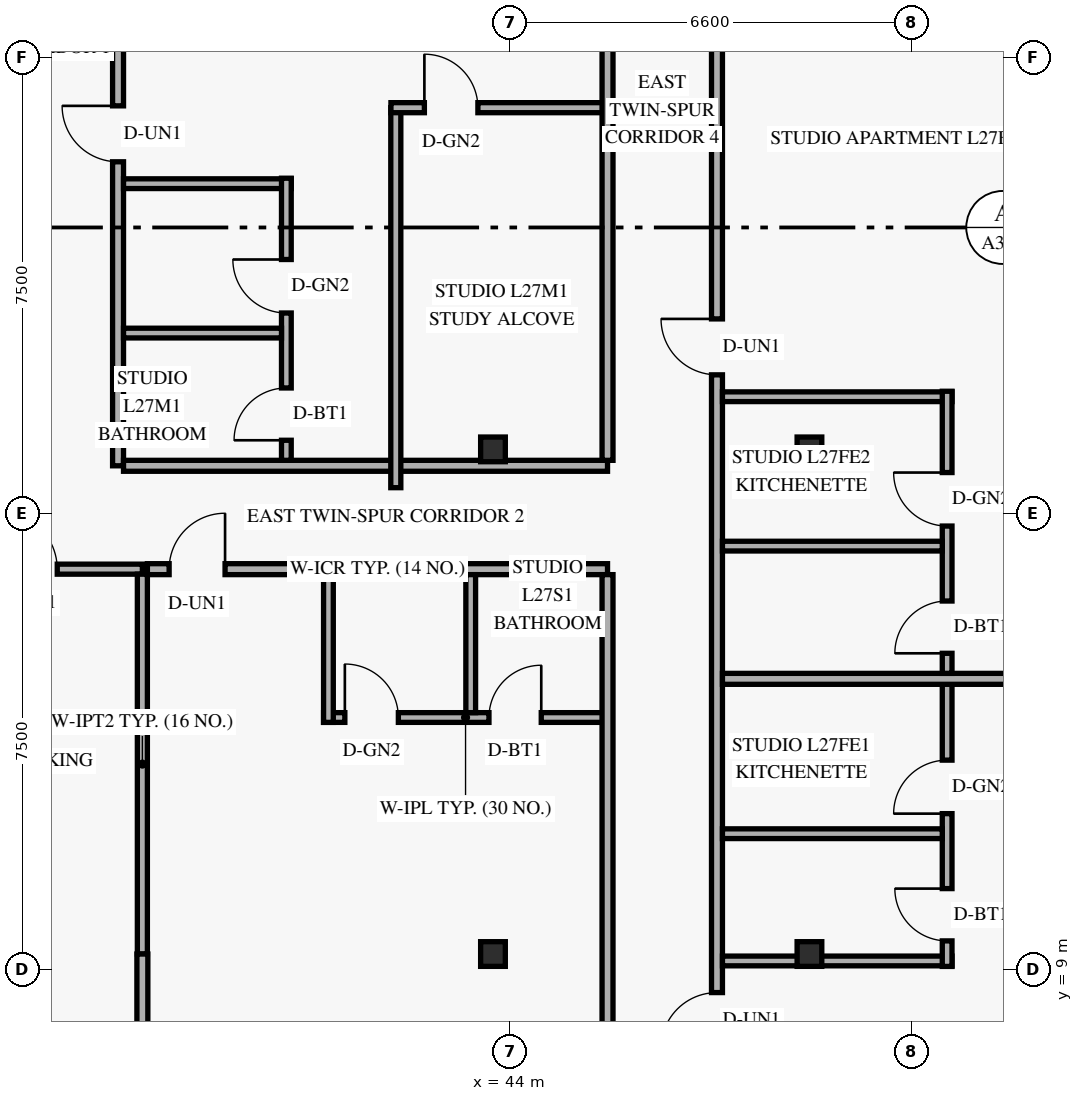
"""IFC4 building model, lengths in metres.
Left out: names, types, materials, properties, quantities, classifications, styles, units other than length and angle.
Written with IfcOpenShell. Run it as: python <this file> out.ifc"""

import sys

from ifc_helpers import new_model, si_unit, direction, frame, frame_2d, origin, origin_2d, place, context, subcontext, project, spatial, rectangle, hollow_rectangle, extrude, element, fill, save


model = new_model("IFC4")
c1 = context("Model", 3, precision=1e-05, world=origin(), true_north=direction((0.0, 1.0)))
c2 = subcontext(c1, "Body", "Model", "MODEL_VIEW")
j1 = project(units=[si_unit("LENGTHUNIT", "METRE"), si_unit("PLANEANGLEUNIT", "RADIAN")], contexts=[c1])
p1 = place(None, origin())
s1 = spatial("IfcSite", under=j1, at=p1, CompositionType="ELEMENT")
p2 = place(p1, origin())
s2 = spatial("IfcBuilding", under=s1, at=p2, CompositionType="ELEMENT")
p3 = place(p2, frame((0.0, 0.0, 106.2)))
s3 = spatial("IfcBuildingStorey", under=s2, at=p3, CompositionType="ELEMENT", Elevation=106.2)
for number, where, z_axis, x_axis in (
    (1, (43.653, 9.25, 0.0), (0.035, 0.0, 0.999), (0.0, 1.0, 0.0)),
    (2, (43.653, 17.55, 0.0), (0.035, 0.0, 0.999), (0.0, 1.0, 0.0)),
):
    element("IfcColumn", number, at=place(p3, frame(where, z_axis=z_axis, x_axis=x_axis)), inside=s3, PredefinedType="COLUMN", context=c2, shape_type="SweptSolid", body=[
        extrude(hollow_rectangle(XDim=0.406, YDim=0.406, WallThickness=0.016, at=origin_2d()), origin(), (0.0, 0.0, 1.0), 3.602),
    ])
for number, where, z_axis, x_axis in (
    (3, (48.816, 9.25, 0.0), (0.058, 0.0, 0.998), (0.0, 1.0, 0.0)),
    (4, (48.816, 17.55, 0.0), (0.058, 0.0, 0.998), (0.0, 1.0, 0.0)),
):
    element("IfcColumn", number, at=place(p3, frame(where, z_axis=z_axis, x_axis=x_axis)), inside=s3, PredefinedType="COLUMN", context=c2, shape_type="SweptSolid", body=[
        extrude(hollow_rectangle(XDim=0.406, YDim=0.406, WallThickness=0.016, at=origin_2d()), origin(), (0.0, 0.0, 1.0), 3.606),
    ])
p4 = place(p3, frame((32.732, 15.58, 0.0), z_axis=(0.0, 0.0, 1.0), x_axis=(1.0, 0.0, 0.0)))
e5 = element("IfcWall", 5, at=p4, inside=s3, PredefinedType="PARTITIONING", context=c2, shape_type="SweptSolid", body=[
    extrude(rectangle(XDim=5.218, YDim=0.165, at=frame_2d((2.609, 0.0))), origin(), (0.0, 0.0, 1.0), 2.731),
])
p5 = place(p4, frame((2.867, 0.0, 0.0)))
e6 = element("IfcOpeningElement", 6, at=p5, cuts=e5, PredefinedType="OPENING", context=c2, shape_type="SweptSolid", body=[
    extrude(rectangle(XDim=0.95, YDim=2.15, at=frame_2d((0.475, 1.075))), frame((0.0, 0.093, 0.0), z_axis=(0.0, -1.0, 0.0), x_axis=(1.0, 0.0, 0.0)), (0.0, 0.0, 1.0), 0.185),
])
p6 = place(p3, frame((37.95, 9.25, 0.0), z_axis=(0.0, 0.0, 1.0), x_axis=(0.0, 1.0, 0.0)))
e7 = element("IfcWall", 7, at=p6, inside=s3, PredefinedType="PARTITIONING", context=c2, shape_type="SweptSolid", body=[
    extrude(rectangle(XDim=6.248, YDim=0.165, at=frame_2d((3.124, 0.0))), origin(), (0.0, 0.0, 1.0), 2.731),
])
p7 = place(p3, frame((37.55, 17.28, 0.0), z_axis=(0.0, 0.0, 1.0), x_axis=(0.0, 1.0, 0.0)))
e8 = element("IfcWall", 8, at=p7, inside=s3, PredefinedType="STANDARD", context=c2, shape_type="SweptSolid", body=[
    extrude(rectangle(XDim=10.28, YDim=0.18, at=frame_2d((5.14, 0.0))), origin(), (0.0, 0.0, 1.0), 2.731),
])
p8 = place(p7, frame((5.0, 0.0, 0.0)))
e9 = element("IfcOpeningElement", 9, at=p8, cuts=e8, PredefinedType="OPENING", context=c2, shape_type="SweptSolid", body=[
    extrude(rectangle(XDim=0.92, YDim=2.15, at=frame_2d((0.46, 1.075))), frame((0.0, 0.1, 0.0), z_axis=(0.0, -1.0, 0.0), x_axis=(1.0, 0.0, 0.0)), (0.0, 0.0, 1.0), 0.2),
])
p9 = place(p3, frame((38.032, 15.58, 0.0), z_axis=(0.0, 0.0, 1.0), x_axis=(1.0, 0.0, 0.0)))
e10 = element("IfcWall", 10, at=p9, inside=s3, PredefinedType="STANDARD", context=c2, shape_type="SweptSolid", body=[
    extrude(rectangle(XDim=7.568, YDim=0.18, at=frame_2d((3.784, 0.0))), origin(), (0.0, 0.0, 1.0), 2.731),
])
p10 = place(p9, frame((0.357, 0.0, 0.0)))
e11 = element("IfcOpeningElement", 11, at=p10, cuts=e10, PredefinedType="OPENING", context=c2, shape_type="SweptSolid", body=[
    extrude(rectangle(XDim=0.92, YDim=2.15, at=frame_2d((0.46, 1.075))), frame((0.0, 0.1, 0.0), z_axis=(0.0, -1.0, 0.0), x_axis=(1.0, 0.0, 0.0)), (0.0, 0.0, 1.0), 0.2),
])
p11 = place(p3, frame((37.64, 17.28, 0.0), z_axis=(0.0, 0.0, 1.0), x_axis=(1.0, 0.0, 0.0)))
e12 = element("IfcWall", 12, at=p11, inside=s3, PredefinedType="STANDARD", context=c2, shape_type="SweptSolid", body=[
    extrude(rectangle(XDim=7.96, YDim=0.18, at=frame_2d((3.98, 0.0))), origin(), (0.0, 0.0, 1.0), 2.731),
])
p12 = place(p3, frame((37.95, 2.98, 0.0), z_axis=(0.0, 0.0, 1.0), x_axis=(0.0, 1.0, 0.0)))
e13 = element("IfcWall", 13, at=p12, inside=s3, PredefinedType="PARTITIONING", context=c2, shape_type="SweptSolid", body=[
    extrude(rectangle(XDim=6.27, YDim=0.18, at=frame_2d((3.135, 0.0))), origin(), (0.0, 0.0, 1.0), 2.731),
])
p13 = place(p3, frame((40.93, 13.14, 0.0), z_axis=(0.0, 0.0, 1.0), x_axis=(1.0, 0.0, 0.0)))
e14 = element("IfcWall", 14, at=p13, inside=s3, PredefinedType="PLUMBINGWALL", context=c2, shape_type="SweptSolid", body=[
    extrude(rectangle(XDim=4.67, YDim=0.16, at=frame_2d((2.335, 0.0))), origin(), (0.0, 0.0, 1.0), 2.731),
])
p14 = place(p13, frame((0.35, 0.0, 0.0)))
e15 = element("IfcOpeningElement", 15, at=p14, cuts=e14, PredefinedType="OPENING", context=c2, shape_type="SweptSolid", body=[
    extrude(rectangle(XDim=0.88, YDim=2.12, at=frame_2d((0.44, 1.06))), frame((0.0, 0.09, 0.0), z_axis=(0.0, -1.0, 0.0), x_axis=(1.0, 0.0, 0.0)), (0.0, 0.0, 1.0), 0.18),
])
p15 = place(p13, frame((2.72, 0.0, 0.0)))
e16 = element("IfcOpeningElement", 16, at=p15, cuts=e14, PredefinedType="OPENING", context=c2, shape_type="SweptSolid", body=[
    extrude(rectangle(XDim=0.86, YDim=2.12, at=frame_2d((0.43, 1.06))), frame((0.0, 0.09, 0.0), z_axis=(0.0, -1.0, 0.0), x_axis=(1.0, 0.0, 0.0)), (0.0, 0.0, 1.0), 0.18),
])
p16 = place(p3, frame((41.01, 13.06, 0.0), z_axis=(0.0, 0.0, 1.0), x_axis=(0.0, 1.0, 0.0)))
e17 = element("IfcWall", 17, at=p16, inside=s3, PredefinedType="PLUMBINGWALL", context=c2, shape_type="SweptSolid", body=[
    extrude(rectangle(XDim=2.43, YDim=0.16, at=frame_2d((1.215, 0.0))), origin(), (0.0, 0.0, 1.0), 2.988),
])
p17 = place(p3, frame((43.35, 13.22, 0.0), z_axis=(0.0, 0.0, 1.0), x_axis=(0.0, 1.0, 0.0)))
e18 = element("IfcWall", 18, at=p17, inside=s3, PredefinedType="PLUMBINGWALL", context=c2, shape_type="SweptSolid", body=[
    extrude(rectangle(XDim=2.27, YDim=0.16, at=frame_2d((1.135, 0.0))), origin(), (0.0, 0.0, 1.0), 2.988),
])
p18 = place(p3, frame((37.64, 21.92, 0.0), z_axis=(0.0, 0.0, 1.0), x_axis=(1.0, 0.0, 0.0)))
e19 = element("IfcWall", 19, at=p18, inside=s3, PredefinedType="PLUMBINGWALL", context=c2, shape_type="SweptSolid", body=[
    extrude(rectangle(XDim=2.758, YDim=0.16, at=frame_2d((1.379, 0.0))), origin(), (0.0, 0.0, 1.0), 3.36),
])
p19 = place(p3, frame((40.318, 17.37, 0.0), z_axis=(0.0, 0.0, 1.0), x_axis=(0.0, 1.0, 0.0)))
e20 = element("IfcWall", 20, at=p19, inside=s3, PredefinedType="PLUMBINGWALL", context=c2, shape_type="SweptSolid", body=[
    extrude(rectangle(XDim=4.64, YDim=0.16, at=frame_2d((2.32, 0.0))), origin(), (0.0, 0.0, 1.0), 2.731),
])
p20 = place(p19, frame((0.33, 0.0, 0.0)))
e21 = element("IfcOpeningElement", 21, at=p20, cuts=e20, PredefinedType="OPENING", context=c2, shape_type="SweptSolid", body=[
    extrude(rectangle(XDim=0.86, YDim=2.12, at=frame_2d((0.43, 1.06))), frame((0.0, 0.09, 0.0), z_axis=(0.0, -1.0, 0.0), x_axis=(1.0, 0.0, 0.0)), (0.0, 0.0, 1.0), 0.18),
])
p21 = place(p19, frame((2.423, 0.0, 0.0)))
e22 = element("IfcOpeningElement", 22, at=p21, cuts=e20, PredefinedType="OPENING", context=c2, shape_type="SweptSolid", body=[
    extrude(rectangle(XDim=0.88, YDim=2.12, at=frame_2d((0.44, 1.06))), frame((0.0, 0.09, 0.0), z_axis=(0.0, -1.0, 0.0), x_axis=(1.0, 0.0, 0.0)), (0.0, 0.0, 1.0), 0.18),
])
p22 = place(p3, frame((37.64, 19.463, 0.0), z_axis=(0.0, 0.0, 1.0), x_axis=(1.0, 0.0, 0.0)))
e23 = element("IfcWall", 23, at=p22, inside=s3, PredefinedType="PLUMBINGWALL", context=c2, shape_type="SweptSolid", body=[
    extrude(rectangle(XDim=2.598, YDim=0.16, at=frame_2d((1.299, 0.0))), origin(), (0.0, 0.0, 1.0), 3.36),
])
p23 = place(p3, frame((42.118, 16.92, 0.0), z_axis=(0.0, 0.0, 1.0), x_axis=(0.0, 1.0, 0.0)))
e24 = element("IfcWall", 24, at=p23, inside=s3, PredefinedType="PARTITIONING", context=c2, shape_type="SweptSolid", body=[
    extrude(rectangle(XDim=6.25, YDim=0.165, at=frame_2d((3.125, 0.0))), origin(), (0.0, 0.0, 1.0), 2.731),
])
p24 = place(p3, frame((42.038, 23.17, 0.0), z_axis=(0.0, 0.0, 1.0), x_axis=(1.0, 0.0, 0.0)))
e25 = element("IfcWall", 25, at=p24, inside=s3, PredefinedType="PARTITIONING", context=c2, shape_type="SweptSolid", body=[
    extrude(rectangle(XDim=3.922, YDim=0.165, at=frame_2d((1.961, 0.0))), origin(), (0.0, 0.0, 1.0), 2.731),
])
p25 = place(p24, frame((0.55, 0.0, 0.0)))
e26 = element("IfcOpeningElement", 26, at=p25, cuts=e25, PredefinedType="OPENING", context=c2, shape_type="SweptSolid", body=[
    extrude(rectangle(XDim=0.88, YDim=2.12, at=frame_2d((0.44, 1.06))), frame((0.0, 0.093, 0.0), z_axis=(0.0, -1.0, 0.0), x_axis=(1.0, 0.0, 0.0)), (0.0, 0.0, 1.0), 0.185),
])
p26 = place(p3, frame((47.4, 2.98, 0.0), z_axis=(0.0, 0.0, 1.0), x_axis=(0.0, 1.0, 0.0)))
e27 = element("IfcWall", 27, at=p26, inside=s3, PredefinedType="STANDARD", context=c2, shape_type="SweptSolid", body=[
    extrude(rectangle(XDim=42.04, YDim=0.18, at=frame_2d((21.02, 0.0))), origin(), (0.0, 0.0, 1.0), 2.731),
])
p27 = place(p26, frame((4.716, 0.0, 0.0)))
e28 = element("IfcOpeningElement", 28, at=p27, cuts=e27, PredefinedType="OPENING", context=c2, shape_type="SweptSolid", body=[
    extrude(rectangle(XDim=0.92, YDim=2.15, at=frame_2d((0.46, 1.075))), frame((0.0, 0.1, 0.0), z_axis=(0.0, -1.0, 0.0), x_axis=(1.0, 0.0, 0.0)), (0.0, 0.0, 1.0), 0.2),
])
p28 = place(p26, frame((15.796, 0.0, 0.0)))
e29 = element("IfcOpeningElement", 29, at=p28, cuts=e27, PredefinedType="OPENING", context=c2, shape_type="SweptSolid", body=[
    extrude(rectangle(XDim=0.92, YDim=2.15, at=frame_2d((0.46, 1.075))), frame((0.0, 0.1, 0.0), z_axis=(0.0, -1.0, 0.0), x_axis=(1.0, 0.0, 0.0)), (0.0, 0.0, 1.0), 0.2),
])
p29 = place(p26, frame((23.565, 0.0, 0.0)))
e30 = element("IfcOpeningElement", 30, at=p29, cuts=e27, PredefinedType="OPENING", context=c2, shape_type="SweptSolid", body=[
    extrude(rectangle(XDim=0.92, YDim=2.15, at=frame_2d((0.46, 1.075))), frame((0.0, 0.1, 0.0), z_axis=(0.0, -1.0, 0.0), x_axis=(1.0, 0.0, 0.0)), (0.0, 0.0, 1.0), 0.2),
])
p30 = place(p26, frame((39.348, 0.0, 0.0)))
e31 = element("IfcOpeningElement", 31, at=p30, cuts=e27, PredefinedType="OPENING", context=c2, shape_type="SweptSolid", body=[
    extrude(rectangle(XDim=0.92, YDim=2.15, at=frame_2d((0.46, 1.075))), frame((0.0, 0.1, 0.0), z_axis=(0.0, -1.0, 0.0), x_axis=(1.0, 0.0, 0.0)), (0.0, 0.0, 1.0), 0.2),
])
p31 = place(p3, frame((45.6, 2.98, 0.0), z_axis=(0.0, 0.0, 1.0), x_axis=(0.0, 1.0, 0.0)))
e32 = element("IfcWall", 32, at=p31, inside=s3, PredefinedType="STANDARD", context=c2, shape_type="SweptSolid", body=[
    extrude(rectangle(XDim=12.51, YDim=0.18, at=frame_2d((6.255, 0.0))), origin(), (0.0, 0.0, 1.0), 2.731),
])
p32 = place(p3, frame((45.6, 17.37, 0.0), z_axis=(0.0, 0.0, 1.0), x_axis=(0.0, 1.0, 0.0)))
e33 = element("IfcWall", 33, at=p32, inside=s3, PredefinedType="STANDARD", context=c2, shape_type="SweptSolid", body=[
    extrude(rectangle(XDim=10.1, YDim=0.18, at=frame_2d((5.05, 0.0))), origin(), (0.0, 0.0, 1.0), 2.731),
])
p33 = place(p3, frame((47.49, 9.136, 0.0), z_axis=(0.0, 0.0, 1.0), x_axis=(1.0, 0.0, 0.0)))
e34 = element("IfcWall", 34, at=p33, inside=s3, PredefinedType="PLUMBINGWALL", context=c2, shape_type="SweptSolid", body=[
    extrude(rectangle(XDim=3.775, YDim=0.16, at=frame_2d((1.888, 0.0))), origin(), (0.0, 0.0, 1.0), 2.731),
])
p34 = place(p3, frame((51.185, 9.046, 0.0), z_axis=(0.0, 0.0, 1.0), x_axis=(0.0, 1.0, 0.0)))
e35 = element("IfcWall", 35, at=p34, inside=s3, PredefinedType="PLUMBINGWALL", context=c2, shape_type="SweptSolid", body=[
    extrude(rectangle(XDim=4.73, YDim=0.16, at=frame_2d((2.365, 0.0))), origin(), (0.0, 0.0, 1.0), 3.36),
])
p35 = place(p34, frame((0.42, 0.0, 0.0)))
e36 = element("IfcOpeningElement", 36, at=p35, cuts=e35, PredefinedType="OPENING", context=c2, shape_type="SweptSolid", body=[
    extrude(rectangle(XDim=0.86, YDim=2.12, at=frame_2d((0.43, 1.06))), frame((0.0, 0.09, 0.0), z_axis=(0.0, -1.0, 0.0), x_axis=(1.0, 0.0, 0.0)), (0.0, 0.0, 1.0), 0.18),
])
p36 = place(p34, frame((2.513, 0.0, 0.0)))
e37 = element("IfcOpeningElement", 37, at=p36, cuts=e35, PredefinedType="OPENING", context=c2, shape_type="SweptSolid", body=[
    extrude(rectangle(XDim=0.88, YDim=2.12, at=frame_2d((0.44, 1.06))), frame((0.0, 0.09, 0.0), z_axis=(0.0, -1.0, 0.0), x_axis=(1.0, 0.0, 0.0)), (0.0, 0.0, 1.0), 0.18),
])
p37 = place(p3, frame((47.49, 11.229, 0.0), z_axis=(0.0, 0.0, 1.0), x_axis=(1.0, 0.0, 0.0)))
e38 = element("IfcWall", 38, at=p37, inside=s3, PredefinedType="PLUMBINGWALL", context=c2, shape_type="SweptSolid", body=[
    extrude(rectangle(XDim=3.615, YDim=0.16, at=frame_2d((1.808, 0.0))), origin(), (0.0, 0.0, 1.0), 2.809),
])
p38 = place(p3, frame((47.49, 13.776, 0.0), z_axis=(0.0, 0.0, 1.0), x_axis=(1.0, 0.0, 0.0)))
e39 = element("IfcWall", 39, at=p38, inside=s3, PredefinedType="PARTITIONING", context=c2, shape_type="SweptSolid", body=[
    extrude(rectangle(XDim=5.83, YDim=0.18, at=frame_2d((2.915, 0.0))), origin(), (0.0, 0.0, 1.0), 2.809),
])
p39 = place(p3, frame((47.49, 18.416, 0.0), z_axis=(0.0, 0.0, 1.0), x_axis=(1.0, 0.0, 0.0)))
e40 = element("IfcWall", 40, at=p39, inside=s3, PredefinedType="PLUMBINGWALL", context=c2, shape_type="SweptSolid", body=[
    extrude(rectangle(XDim=3.775, YDim=0.16, at=frame_2d((1.888, 0.0))), origin(), (0.0, 0.0, 1.0), 2.809),
])
p40 = place(p3, frame((51.185, 13.866, 0.0), z_axis=(0.0, 0.0, 1.0), x_axis=(0.0, 1.0, 0.0)))
e41 = element("IfcWall", 41, at=p40, inside=s3, PredefinedType="PLUMBINGWALL", context=c2, shape_type="SweptSolid", body=[
    extrude(rectangle(XDim=4.64, YDim=0.16, at=frame_2d((2.32, 0.0))), origin(), (0.0, 0.0, 1.0), 3.36),
])
p41 = place(p40, frame((0.33, 0.0, 0.0)))
e42 = element("IfcOpeningElement", 42, at=p41, cuts=e41, PredefinedType="OPENING", context=c2, shape_type="SweptSolid", body=[
    extrude(rectangle(XDim=0.86, YDim=2.12, at=frame_2d((0.43, 1.06))), frame((0.0, 0.09, 0.0), z_axis=(0.0, -1.0, 0.0), x_axis=(1.0, 0.0, 0.0)), (0.0, 0.0, 1.0), 0.18),
])
p42 = place(p40, frame((2.423, 0.0, 0.0)))
e43 = element("IfcOpeningElement", 43, at=p42, cuts=e41, PredefinedType="OPENING", context=c2, shape_type="SweptSolid", body=[
    extrude(rectangle(XDim=0.88, YDim=2.12, at=frame_2d((0.44, 1.06))), frame((0.0, 0.09, 0.0), z_axis=(0.0, -1.0, 0.0), x_axis=(1.0, 0.0, 0.0)), (0.0, 0.0, 1.0), 0.18),
])
p43 = place(p3, frame((47.49, 15.959, 0.0), z_axis=(0.0, 0.0, 1.0), x_axis=(1.0, 0.0, 0.0)))
e44 = element("IfcWall", 44, at=p43, inside=s3, PredefinedType="PLUMBINGWALL", context=c2, shape_type="SweptSolid", body=[
    extrude(rectangle(XDim=3.615, YDim=0.16, at=frame_2d((1.808, 0.0))), origin(), (0.0, 0.0, 1.0), 2.809),
])
p44 = place(p5, origin())
e45 = element("IfcDoor", 45, at=p44, inside=s3, OperationType="SINGLE_SWING_LEFT", PredefinedType="DOOR", context=c2, shape_type="SweptSolid", body=[
    extrude(rectangle(XDim=0.95, YDim=2.15, at=frame_2d((0.475, 1.075))), frame((0.0, 0.025, 0.0), z_axis=(0.0, -1.0, 0.0), x_axis=(1.0, 0.0, 0.0)), (0.0, 0.0, 1.0), 0.05),
])
fill(e6, e45)
p45 = place(p10, origin())
e46 = element("IfcDoor", 46, at=p45, inside=s3, OperationType="SINGLE_SWING_RIGHT", PredefinedType="DOOR", context=c2, shape_type="SweptSolid", body=[
    extrude(rectangle(XDim=0.92, YDim=2.15, at=frame_2d((0.46, 1.075))), frame((0.0, 0.025, 0.0), z_axis=(0.0, -1.0, 0.0), x_axis=(1.0, 0.0, 0.0)), (0.0, 0.0, 1.0), 0.05),
])
fill(e11, e46)
p46 = place(p14, origin())
e47 = element("IfcDoor", 47, at=p46, inside=s3, OperationType="SINGLE_SWING_LEFT", PredefinedType="DOOR", context=c2, shape_type="SweptSolid", body=[
    extrude(rectangle(XDim=0.88, YDim=2.12, at=frame_2d((0.44, 1.06))), frame((0.0, 0.025, 0.0), z_axis=(0.0, -1.0, 0.0), x_axis=(1.0, 0.0, 0.0)), (0.0, 0.0, 1.0), 0.05),
])
fill(e15, e47)
p47 = place(p15, origin())
e48 = element("IfcDoor", 48, at=p47, inside=s3, OperationType="SINGLE_SWING_RIGHT", PredefinedType="DOOR", context=c2, shape_type="SweptSolid", body=[
    extrude(rectangle(XDim=0.86, YDim=2.12, at=frame_2d((0.43, 1.06))), frame((0.0, 0.025, 0.0), z_axis=(0.0, -1.0, 0.0), x_axis=(1.0, 0.0, 0.0)), (0.0, 0.0, 1.0), 0.05),
])
fill(e16, e48)
p48 = place(p25, origin())
e49 = element("IfcDoor", 49, at=p48, inside=s3, OperationType="SINGLE_SWING_LEFT", PredefinedType="DOOR", context=c2, shape_type="SweptSolid", body=[
    extrude(rectangle(XDim=0.88, YDim=2.12, at=frame_2d((0.44, 1.06))), frame((0.0, 0.025, 0.0), z_axis=(0.0, -1.0, 0.0), x_axis=(1.0, 0.0, 0.0)), (0.0, 0.0, 1.0), 0.05),
])
fill(e26, e49)
p49 = place(p8, origin())
e50 = element("IfcDoor", 50, at=p49, inside=s3, OperationType="SINGLE_SWING_RIGHT", PredefinedType="DOOR", context=c2, shape_type="SweptSolid", body=[
    extrude(rectangle(XDim=0.92, YDim=2.15, at=frame_2d((0.46, 1.075))), frame((0.0, 0.025, 0.0), z_axis=(0.0, -1.0, 0.0), x_axis=(1.0, 0.0, 0.0)), (0.0, 0.0, 1.0), 0.05),
])
fill(e9, e50)
p50 = place(p20, origin())
e51 = element("IfcDoor", 51, at=p50, inside=s3, OperationType="SINGLE_SWING_LEFT", PredefinedType="DOOR", context=c2, shape_type="SweptSolid", body=[
    extrude(rectangle(XDim=0.86, YDim=2.12, at=frame_2d((0.43, 1.06))), frame((0.0, 0.025, 0.0), z_axis=(0.0, -1.0, 0.0), x_axis=(1.0, 0.0, 0.0)), (0.0, 0.0, 1.0), 0.05),
])
fill(e21, e51)
p51 = place(p21, origin())
e52 = element("IfcDoor", 52, at=p51, inside=s3, OperationType="SINGLE_SWING_RIGHT", PredefinedType="DOOR", context=c2, shape_type="SweptSolid", body=[
    extrude(rectangle(XDim=0.88, YDim=2.12, at=frame_2d((0.44, 1.06))), frame((0.0, 0.025, 0.0), z_axis=(0.0, -1.0, 0.0), x_axis=(1.0, 0.0, 0.0)), (0.0, 0.0, 1.0), 0.05),
])
fill(e22, e52)
p52 = place(p27, origin())
e53 = element("IfcDoor", 53, at=p52, inside=s3, OperationType="SINGLE_SWING_LEFT", PredefinedType="DOOR", context=c2, shape_type="SweptSolid", body=[
    extrude(rectangle(XDim=0.92, YDim=2.15, at=frame_2d((0.46, 1.075))), frame((0.0, 0.025, 0.0), z_axis=(0.0, -1.0, 0.0), x_axis=(1.0, 0.0, 0.0)), (0.0, 0.0, 1.0), 0.05),
])
fill(e28, e53)
p53 = place(p35, origin())
e54 = element("IfcDoor", 54, at=p53, inside=s3, OperationType="SINGLE_SWING_RIGHT", PredefinedType="DOOR", context=c2, shape_type="SweptSolid", body=[
    extrude(rectangle(XDim=0.86, YDim=2.12, at=frame_2d((0.43, 1.06))), frame((0.0, 0.025, 0.0), z_axis=(0.0, -1.0, 0.0), x_axis=(1.0, 0.0, 0.0)), (0.0, 0.0, 1.0), 0.05),
])
fill(e36, e54)
p54 = place(p36, origin())
e55 = element("IfcDoor", 55, at=p54, inside=s3, OperationType="SINGLE_SWING_LEFT", PredefinedType="DOOR", context=c2, shape_type="SweptSolid", body=[
    extrude(rectangle(XDim=0.88, YDim=2.12, at=frame_2d((0.44, 1.06))), frame((0.0, 0.025, 0.0), z_axis=(0.0, -1.0, 0.0), x_axis=(1.0, 0.0, 0.0)), (0.0, 0.0, 1.0), 0.05),
])
fill(e37, e55)
p55 = place(p28, origin())
e56 = element("IfcDoor", 56, at=p55, inside=s3, OperationType="SINGLE_SWING_RIGHT", PredefinedType="DOOR", context=c2, shape_type="SweptSolid", body=[
    extrude(rectangle(XDim=0.92, YDim=2.15, at=frame_2d((0.46, 1.075))), frame((0.0, 0.025, 0.0), z_axis=(0.0, -1.0, 0.0), x_axis=(1.0, 0.0, 0.0)), (0.0, 0.0, 1.0), 0.05),
])
fill(e29, e56)
p56 = place(p41, origin())
e57 = element("IfcDoor", 57, at=p56, inside=s3, OperationType="SINGLE_SWING_LEFT", PredefinedType="DOOR", context=c2, shape_type="SweptSolid", body=[
    extrude(rectangle(XDim=0.86, YDim=2.12, at=frame_2d((0.43, 1.06))), frame((0.0, 0.025, 0.0), z_axis=(0.0, -1.0, 0.0), x_axis=(1.0, 0.0, 0.0)), (0.0, 0.0, 1.0), 0.05),
])
fill(e42, e57)
p57 = place(p42, origin())
e58 = element("IfcDoor", 58, at=p57, inside=s3, OperationType="SINGLE_SWING_RIGHT", PredefinedType="DOOR", context=c2, shape_type="SweptSolid", body=[
    extrude(rectangle(XDim=0.88, YDim=2.12, at=frame_2d((0.44, 1.06))), frame((0.0, 0.025, 0.0), z_axis=(0.0, -1.0, 0.0), x_axis=(1.0, 0.0, 0.0)), (0.0, 0.0, 1.0), 0.05),
])
fill(e43, e58)
save(model, sys.argv[1])
